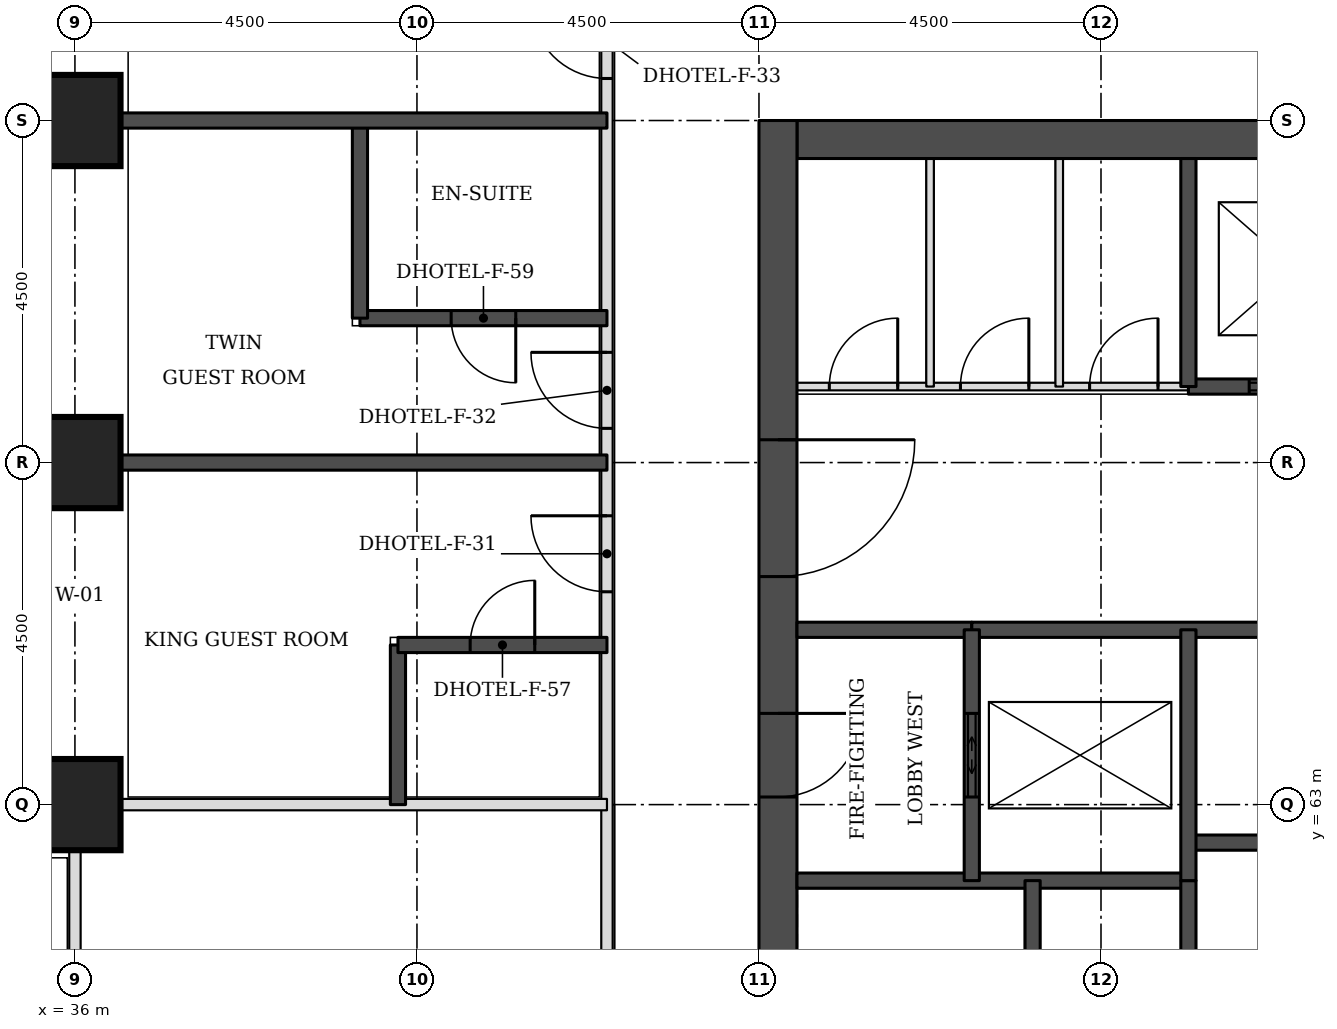
"""IFC4 building model, lengths in metres.
Left out: names, types, materials, properties, quantities, classifications, styles, units other than length and angle.
Written with IfcOpenShell. Run it as: python <this file> out.ifc"""

import sys

from ifc_helpers import new_model, si_unit, direction, frame, frame_2d, origin, origin_2d, place, context, subcontext, project, spatial, rectangle, extrude, element, fill, save


model = new_model("IFC4")
c1 = context("Model", 3, precision=1e-05, world=origin(), true_north=direction((0.0, 1.0)))
c2 = subcontext(c1, "Body", "Model", "MODEL_VIEW")
j1 = project(units=[si_unit("LENGTHUNIT", "METRE"), si_unit("PLANEANGLEUNIT", "RADIAN")], contexts=[c1])
p1 = place(None, origin())
s1 = spatial("IfcSite", under=j1, at=p1, CompositionType="ELEMENT")
p2 = place(p1, origin())
s2 = spatial("IfcBuilding", under=s1, at=p2, CompositionType="ELEMENT")
p3 = place(p2, frame((0.0, 0.0, 42.9)))
s3 = spatial("IfcBuildingStorey", under=s2, at=p3, CompositionType="ELEMENT", Elevation=42.9)
for number, where, z_axis, x_axis in (
    (1, (36.0, 63.0, 0.0), (0.0, 0.0, 1.0), (1.0, 0.0, 0.0)),
    (2, (36.0, 67.5, 0.0), (0.0, 0.0, 1.0), (1.0, 0.0, 0.0)),
    (3, (36.0, 72.0, 0.0), (0.0, 0.0, 1.0), (1.0, 0.0, 0.0)),
):
    element("IfcColumn", number, at=place(p3, frame(where, z_axis=z_axis, x_axis=x_axis)), inside=s3, PredefinedType="COLUMN", context=c2, shape_type="SweptSolid", body=[
        extrude(rectangle(XDim=1.2, YDim=1.2, at=origin_2d()), origin(), (0.0, 0.0, 1.0), 3.3),
    ])
p4 = place(p3, frame((45.5, 71.75, 0.0), z_axis=(0.0, 0.0, 1.0), x_axis=(1.0, 0.0, 0.0)))
e4 = element("IfcWall", 4, at=p4, inside=s3, PredefinedType="SHEAR", context=c2, shape_type="SweptSolid", body=[
    extrude(rectangle(XDim=21.5, YDim=0.5, at=frame_2d((10.75, 0.0))), origin(), (0.0, 0.0, 1.0), 3.3),
])
p5 = place(p3, frame((45.25, 49.5, 0.0), z_axis=(0.0, 0.0, 1.0), x_axis=(0.0, 1.0, 0.0)))
e5 = element("IfcWall", 5, at=p5, inside=s3, PredefinedType="SHEAR", context=c2, shape_type="SweptSolid", body=[
    extrude(rectangle(XDim=22.5, YDim=0.5, at=frame_2d((11.25, 0.0))), origin(), (0.0, 0.0, 1.0), 3.3),
])
p6 = place(p5, frame((4.2, 0.0, 0.0)))
e6 = element("IfcOpeningElement", 6, at=p6, cuts=e5, PredefinedType="OPENING", context=c2, shape_type="SweptSolid", body=[
    extrude(rectangle(XDim=1.8, YDim=2.1, at=frame_2d((0.9, 1.05))), frame((0.0, 0.26, 0.0), z_axis=(0.0, -1.0, 0.0), x_axis=(1.0, 0.0, 0.0)), (0.0, 0.0, 1.0), 0.52),
])
p7 = place(p5, frame((6.9, 0.0, 0.0)))
e7 = element("IfcOpeningElement", 7, at=p7, cuts=e5, PredefinedType="OPENING", context=c2, shape_type="SweptSolid", body=[
    extrude(rectangle(XDim=1.1, YDim=2.1, at=frame_2d((0.55, 1.05))), frame((0.0, 0.26, 0.0), z_axis=(0.0, -1.0, 0.0), x_axis=(1.0, 0.0, 0.0)), (0.0, 0.0, 1.0), 0.52),
])
p8 = place(p5, frame((13.6, 0.0, 0.0)))
e8 = element("IfcOpeningElement", 8, at=p8, cuts=e5, PredefinedType="OPENING", context=c2, shape_type="SweptSolid", body=[
    extrude(rectangle(XDim=1.1, YDim=2.1, at=frame_2d((0.55, 1.05))), frame((0.0, 0.26, 0.0), z_axis=(0.0, -1.0, 0.0), x_axis=(1.0, 0.0, 0.0)), (0.0, 0.0, 1.0), 0.52),
])
p9 = place(p5, frame((16.5, 0.0, 0.0)))
e9 = element("IfcOpeningElement", 9, at=p9, cuts=e5, PredefinedType="OPENING", context=c2, shape_type="SweptSolid", body=[
    extrude(rectangle(XDim=1.8, YDim=2.1, at=frame_2d((0.9, 1.05))), frame((0.0, 0.26, 0.0), z_axis=(0.0, -1.0, 0.0), x_axis=(1.0, 0.0, 0.0)), (0.0, 0.0, 1.0), 0.52),
])
p10 = place(p3, frame((43.0, 57.35, 0.0), z_axis=(0.0, 0.0, 1.0), x_axis=(0.0, 1.0, 0.0)))
e10 = element("IfcWall", 10, at=p10, inside=s3, PredefinedType="PARTITIONING", context=c2, shape_type="SweptSolid", body=[
    extrude(rectangle(XDim=16.65, YDim=0.15, at=frame_2d((8.325, 0.0))), origin(), (0.0, 0.0, 1.0), 3.08),
])
p11 = place(p10, frame((8.45, 0.0, 0.0)))
e11 = element("IfcOpeningElement", 11, at=p11, cuts=e10, PredefinedType="OPENING", context=c2, shape_type="SweptSolid", body=[
    extrude(rectangle(XDim=1.0, YDim=2.1, at=frame_2d((0.5, 1.05))), frame((0.0, 0.085, 0.0), z_axis=(0.0, -1.0, 0.0), x_axis=(1.0, 0.0, 0.0)), (0.0, 0.0, 1.0), 0.17),
])
p12 = place(p10, frame((10.6, 0.0, 0.0)))
e12 = element("IfcOpeningElement", 12, at=p12, cuts=e10, PredefinedType="OPENING", context=c2, shape_type="SweptSolid", body=[
    extrude(rectangle(XDim=1.0, YDim=2.1, at=frame_2d((0.5, 1.05))), frame((0.0, 0.085, 0.0), z_axis=(0.0, -1.0, 0.0), x_axis=(1.0, 0.0, 0.0)), (0.0, 0.0, 1.0), 0.17),
])
p13 = place(p10, frame((15.203, 0.0, 0.0)))
e13 = element("IfcOpeningElement", 13, at=p13, cuts=e10, PredefinedType="OPENING", context=c2, shape_type="SweptSolid", body=[
    extrude(rectangle(XDim=1.0, YDim=2.1, at=frame_2d((0.5, 1.05))), frame((0.0, 0.085, 0.0), z_axis=(0.0, -1.0, 0.0), x_axis=(1.0, 0.0, 0.0)), (0.0, 0.0, 1.0), 0.17),
])
p14 = place(p3, frame((40.25, 63.0, 0.0), z_axis=(0.0, 0.0, 1.0), x_axis=(0.0, 1.0, 0.0)))
e14 = element("IfcWall", 14, at=p14, inside=s3, PredefinedType="SOLIDWALL", context=c2, shape_type="SweptSolid", body=[
    extrude(rectangle(XDim=2.1, YDim=0.2, at=frame_2d((1.05, 0.0))), origin(), (0.0, 0.0, 1.0), 3.08),
])
p15 = place(p3, frame((40.25, 65.1, 0.0), z_axis=(0.0, 0.0, 1.0), x_axis=(1.0, 0.0, 0.0)))
e15 = element("IfcWall", 15, at=p15, inside=s3, PredefinedType="SOLIDWALL", context=c2, shape_type="SweptSolid", body=[
    extrude(rectangle(XDim=2.75, YDim=0.2, at=frame_2d((1.375, 0.0))), origin(), (0.0, 0.0, 1.0), 3.08),
])
p16 = place(p15, frame((0.95, 0.0, 0.0)))
e16 = element("IfcOpeningElement", 16, at=p16, cuts=e15, PredefinedType="OPENING", context=c2, shape_type="SweptSolid", body=[
    extrude(rectangle(XDim=0.85, YDim=2.1, at=frame_2d((0.425, 1.05))), frame((0.0, 0.11, 0.0), z_axis=(0.0, -1.0, 0.0), x_axis=(1.0, 0.0, 0.0)), (0.0, 0.0, 1.0), 0.22),
])
p17 = place(p3, frame((36.6, 67.5, 0.0), z_axis=(0.0, 0.0, 1.0), x_axis=(1.0, 0.0, 0.0)))
e17 = element("IfcWall", 17, at=p17, inside=s3, PredefinedType="SOLIDWALL", context=c2, shape_type="SweptSolid", body=[
    extrude(rectangle(XDim=6.4, YDim=0.2, at=frame_2d((3.2, 0.0))), origin(), (0.0, 0.0, 1.0), 3.08),
])
p18 = place(p3, frame((39.75, 69.4, 0.0), z_axis=(0.0, 0.0, 1.0), x_axis=(1.0, 0.0, 0.0)))
e18 = element("IfcWall", 18, at=p18, inside=s3, PredefinedType="SOLIDWALL", context=c2, shape_type="SweptSolid", body=[
    extrude(rectangle(XDim=3.25, YDim=0.2, at=frame_2d((1.625, 0.0))), origin(), (0.0, 0.0, 1.0), 3.08),
])
p19 = place(p18, frame((1.2, 0.0, 0.0)))
e19 = element("IfcOpeningElement", 19, at=p19, cuts=e18, PredefinedType="OPENING", context=c2, shape_type="SweptSolid", body=[
    extrude(rectangle(XDim=0.85, YDim=2.1, at=frame_2d((0.425, 1.05))), frame((0.0, 0.11, 0.0), z_axis=(0.0, -1.0, 0.0), x_axis=(1.0, 0.0, 0.0)), (0.0, 0.0, 1.0), 0.22),
])
p20 = place(p3, frame((39.75, 69.4, 0.0), z_axis=(0.0, 0.0, 1.0), x_axis=(0.0, 1.0, 0.0)))
e20 = element("IfcWall", 20, at=p20, inside=s3, PredefinedType="SOLIDWALL", context=c2, shape_type="SweptSolid", body=[
    extrude(rectangle(XDim=2.6, YDim=0.2, at=frame_2d((1.3, 0.0))), origin(), (0.0, 0.0, 1.0), 3.08),
])
p21 = place(p3, frame((36.6, 72.0, 0.0), z_axis=(0.0, 0.0, 1.0), x_axis=(1.0, 0.0, 0.0)))
e21 = element("IfcWall", 21, at=p21, inside=s3, PredefinedType="SOLIDWALL", context=c2, shape_type="SweptSolid", body=[
    extrude(rectangle(XDim=6.4, YDim=0.2, at=frame_2d((3.2, 0.0))), origin(), (0.0, 0.0, 1.0), 3.08),
])
p22 = place(p3, frame((36.0, 57.35, 0.0), z_axis=(0.0, 0.0, 1.0), x_axis=(0.0, 1.0, 0.0)))
e22 = element("IfcWall", 22, at=p22, inside=s3, PredefinedType="PARTITIONING", context=c2, shape_type="SweptSolid", body=[
    extrude(rectangle(XDim=5.05, YDim=0.15, at=frame_2d((2.525, 0.0))), origin(), (0.0, 0.0, 1.0), 2.33),
])
p23 = place(p3, frame((36.6, 63.0, 0.0), z_axis=(0.0, 0.0, 1.0), x_axis=(1.0, 0.0, 0.0)))
e23 = element("IfcWall", 23, at=p23, inside=s3, PredefinedType="PARTITIONING", context=c2, shape_type="SweptSolid", body=[
    extrude(rectangle(XDim=6.4, YDim=0.15, at=frame_2d((3.2, 0.0))), origin(), (0.0, 0.0, 1.0), 3.08),
])
p24 = place(p3, frame((45.5, 62.0, 0.0), z_axis=(0.0, 0.0, 1.0), x_axis=(1.0, 0.0, 0.0)))
e24 = element("IfcWall", 24, at=p24, inside=s3, PredefinedType="SOLIDWALL", context=c2, shape_type="SweptSolid", body=[
    extrude(rectangle(XDim=5.15, YDim=0.2, at=frame_2d((2.575, 0.0))), origin(), (0.0, 0.0, 1.0), 3.08),
])
p25 = place(p3, frame((50.65, 62.5, 0.0), z_axis=(0.0, 0.0, 1.0), x_axis=(1.0, 0.0, 0.0)))
e25 = element("IfcWall", 25, at=p25, inside=s3, PredefinedType="SOLIDWALL", context=c2, shape_type="SweptSolid", body=[
    extrude(rectangle(XDim=11.2, YDim=0.2, at=frame_2d((5.6, 0.0))), origin(), (0.0, 0.0, 1.0), 3.3),
])
p26 = place(p3, frame((45.5, 65.3, 0.0), z_axis=(0.0, 0.0, 1.0), x_axis=(1.0, 0.0, 0.0)))
e26 = element("IfcWall", 26, at=p26, inside=s3, PredefinedType="SOLIDWALL", context=c2, shape_type="SweptSolid", body=[
    extrude(rectangle(XDim=2.3, YDim=0.2, at=frame_2d((1.15, 0.0))), origin(), (0.0, 0.0, 1.0), 3.08),
])
p27 = place(p3, frame((47.8, 65.3, 0.0), z_axis=(0.0, 0.0, 1.0), x_axis=(1.0, 0.0, 0.0)))
e27 = element("IfcWall", 27, at=p27, inside=s3, PredefinedType="SOLIDWALL", context=c2, shape_type="SweptSolid", body=[
    extrude(rectangle(XDim=16.9, YDim=0.2, at=frame_2d((8.45, 0.0))), origin(), (0.0, 0.0, 1.0), 3.08),
])
p28 = place(p3, frame((45.5, 68.5, 0.0), z_axis=(0.0, 0.0, 1.0), x_axis=(1.0, 0.0, 0.0)))
e28 = element("IfcWall", 28, at=p28, inside=s3, PredefinedType="PARTITIONING", context=c2, shape_type="SweptSolid", body=[
    extrude(rectangle(XDim=5.15, YDim=0.1, at=frame_2d((2.575, 0.0))), origin(), (0.0, 0.0, 1.0), 3.08),
])
p29 = place(p28, frame((0.426, 0.0, 0.0)))
e29 = element("IfcOpeningElement", 29, at=p29, cuts=e28, PredefinedType="OPENING", context=c2, shape_type="SweptSolid", body=[
    extrude(rectangle(XDim=0.9, YDim=2.1, at=frame_2d((0.45, 1.05))), frame((0.0, 0.06, 0.0), z_axis=(0.0, -1.0, 0.0), x_axis=(1.0, 0.0, 0.0)), (0.0, 0.0, 1.0), 0.12),
])
p30 = place(p28, frame((2.151, 0.0, 0.0)))
e30 = element("IfcOpeningElement", 30, at=p30, cuts=e28, PredefinedType="OPENING", context=c2, shape_type="SweptSolid", body=[
    extrude(rectangle(XDim=0.9, YDim=2.1, at=frame_2d((0.45, 1.05))), frame((0.0, 0.06, 0.0), z_axis=(0.0, -1.0, 0.0), x_axis=(1.0, 0.0, 0.0)), (0.0, 0.0, 1.0), 0.12),
])
p31 = place(p28, frame((3.85, 0.0, 0.0)))
e31 = element("IfcOpeningElement", 31, at=p31, cuts=e28, PredefinedType="OPENING", context=c2, shape_type="SweptSolid", body=[
    extrude(rectangle(XDim=0.9, YDim=2.1, at=frame_2d((0.45, 1.05))), frame((0.0, 0.06, 0.0), z_axis=(0.0, -1.0, 0.0), x_axis=(1.0, 0.0, 0.0)), (0.0, 0.0, 1.0), 0.12),
])
p32 = place(p3, frame((50.65, 68.5, 0.0), z_axis=(0.0, 0.0, 1.0), x_axis=(1.0, 0.0, 0.0)))
e32 = element("IfcWall", 32, at=p32, inside=s3, PredefinedType="SOLIDWALL", context=c2, shape_type="SweptSolid", body=[
    extrude(rectangle(XDim=11.2, YDim=0.2, at=frame_2d((5.6, 0.0))), origin(), (0.0, 0.0, 1.0), 3.08),
])
p33 = place(p32, frame((0.8, 0.0, 0.0)))
e33 = element("IfcOpeningElement", 33, at=p33, cuts=e32, PredefinedType="OPENING", context=c2, shape_type="SweptSolid", body=[
    extrude(rectangle(XDim=1.2, YDim=2.1, at=frame_2d((0.6, 1.05))), frame((0.0, 0.11, 0.0), z_axis=(0.0, -1.0, 0.0), x_axis=(1.0, 0.0, 0.0)), (0.0, 0.0, 1.0), 0.22),
])
p34 = place(p32, frame((3.6, 0.0, 0.0)))
e34 = element("IfcOpeningElement", 34, at=p34, cuts=e32, PredefinedType="OPENING", context=c2, shape_type="SweptSolid", body=[
    extrude(rectangle(XDim=1.2, YDim=2.1, at=frame_2d((0.6, 1.05))), frame((0.0, 0.11, 0.0), z_axis=(0.0, -1.0, 0.0), x_axis=(1.0, 0.0, 0.0)), (0.0, 0.0, 1.0), 0.22),
])
p35 = place(p32, frame((6.4, 0.0, 0.0)))
e35 = element("IfcOpeningElement", 35, at=p35, cuts=e32, PredefinedType="OPENING", context=c2, shape_type="SweptSolid", body=[
    extrude(rectangle(XDim=1.2, YDim=2.1, at=frame_2d((0.6, 1.05))), frame((0.0, 0.11, 0.0), z_axis=(0.0, -1.0, 0.0), x_axis=(1.0, 0.0, 0.0)), (0.0, 0.0, 1.0), 0.22),
])
p36 = place(p32, frame((9.2, 0.0, 0.0)))
e36 = element("IfcOpeningElement", 36, at=p36, cuts=e32, PredefinedType="OPENING", context=c2, shape_type="SweptSolid", body=[
    extrude(rectangle(XDim=1.2, YDim=2.1, at=frame_2d((0.6, 1.05))), frame((0.0, 0.11, 0.0), z_axis=(0.0, -1.0, 0.0), x_axis=(1.0, 0.0, 0.0)), (0.0, 0.0, 1.0), 0.22),
])
p37 = place(p3, frame((47.251, 68.5, 0.0), z_axis=(0.0, 0.0, 1.0), x_axis=(0.0, 1.0, 0.0)))
e37 = element("IfcWall", 37, at=p37, inside=s3, PredefinedType="PARTITIONING", context=c2, shape_type="SweptSolid", body=[
    extrude(rectangle(XDim=3.0, YDim=0.1, at=frame_2d((1.5, 0.0))), origin(), (0.0, 0.0, 1.0), 3.08),
])
p38 = place(p3, frame((47.8, 62.0, 0.0), z_axis=(0.0, 0.0, 1.0), x_axis=(0.0, 1.0, 0.0)))
e38 = element("IfcWall", 38, at=p38, inside=s3, PredefinedType="SOLIDWALL", context=c2, shape_type="SweptSolid", body=[
    extrude(rectangle(XDim=3.3, YDim=0.2, at=frame_2d((1.65, 0.0))), origin(), (0.0, 0.0, 1.0), 3.08),
])
p39 = place(p38, frame((1.1, 0.0, 0.0)))
e39 = element("IfcOpeningElement", 39, at=p39, cuts=e38, PredefinedType="OPENING", context=c2, shape_type="SweptSolid", body=[
    extrude(rectangle(XDim=1.1, YDim=2.1, at=frame_2d((0.55, 1.05))), frame((0.0, 0.11, 0.0), z_axis=(0.0, -1.0, 0.0), x_axis=(1.0, 0.0, 0.0)), (0.0, 0.0, 1.0), 0.22),
])
p40 = place(p3, frame((48.6, 56.2, 0.0), z_axis=(0.0, 0.0, 1.0), x_axis=(0.0, 1.0, 0.0)))
e40 = element("IfcWall", 40, at=p40, inside=s3, PredefinedType="SOLIDWALL", context=c2, shape_type="SweptSolid", body=[
    extrude(rectangle(XDim=5.8, YDim=0.2, at=frame_2d((2.9, 0.0))), origin(), (0.0, 0.0, 1.0), 3.08),
])
p41 = place(p3, frame((48.95, 68.5, 0.0), z_axis=(0.0, 0.0, 1.0), x_axis=(0.0, 1.0, 0.0)))
e41 = element("IfcWall", 41, at=p41, inside=s3, PredefinedType="PARTITIONING", context=c2, shape_type="SweptSolid", body=[
    extrude(rectangle(XDim=3.0, YDim=0.1, at=frame_2d((1.5, 0.0))), origin(), (0.0, 0.0, 1.0), 3.08),
])
p42 = place(p3, frame((50.65, 59.0, 0.0), z_axis=(0.0, 0.0, 1.0), x_axis=(0.0, 1.0, 0.0)))
e42 = element("IfcWall", 42, at=p42, inside=s3, PredefinedType="SOLIDWALL", context=c2, shape_type="SweptSolid", body=[
    extrude(rectangle(XDim=3.0, YDim=0.2, at=frame_2d((1.5, 0.0))), origin(), (0.0, 0.0, 1.0), 3.3),
])
p43 = place(p3, frame((50.65, 62.0, 0.0), z_axis=(0.0, 0.0, 1.0), x_axis=(0.0, 1.0, 0.0)))
e43 = element("IfcWall", 43, at=p43, inside=s3, PredefinedType="SOLIDWALL", context=c2, shape_type="SweptSolid", body=[
    extrude(rectangle(XDim=3.3, YDim=0.2, at=frame_2d((1.65, 0.0))), origin(), (0.0, 0.0, 1.0), 3.08),
])
p44 = place(p3, frame((50.65, 68.5, 0.0), z_axis=(0.0, 0.0, 1.0), x_axis=(0.0, 1.0, 0.0)))
e44 = element("IfcWall", 44, at=p44, inside=s3, PredefinedType="SOLIDWALL", context=c2, shape_type="SweptSolid", body=[
    extrude(rectangle(XDim=3.0, YDim=0.2, at=frame_2d((1.5, 0.0))), origin(), (0.0, 0.0, 1.0), 3.08),
])
p45 = place(p11, origin())
e45 = element("IfcDoor", 45, at=p45, inside=s3, OperationType="SINGLE_SWING_RIGHT", PredefinedType="DOOR", context=c2, shape_type="SweptSolid", body=[
    extrude(rectangle(XDim=1.0, YDim=2.1, at=frame_2d((0.5, 1.05))), frame((0.0, 0.025, 0.0), z_axis=(0.0, -1.0, 0.0), x_axis=(1.0, 0.0, 0.0)), (0.0, 0.0, 1.0), 0.05),
])
fill(e11, e45)
p46 = place(p16, origin())
e46 = element("IfcDoor", 46, at=p46, inside=s3, OperationType="SINGLE_SWING_RIGHT", PredefinedType="DOOR", context=c2, shape_type="SweptSolid", body=[
    extrude(rectangle(XDim=0.85, YDim=2.1, at=frame_2d((0.425, 1.05))), frame((0.0, 0.025, 0.0), z_axis=(0.0, -1.0, 0.0), x_axis=(1.0, 0.0, 0.0)), (0.0, 0.0, 1.0), 0.05),
])
fill(e16, e46)
p47 = place(p12, origin())
e47 = element("IfcDoor", 47, at=p47, inside=s3, OperationType="SINGLE_SWING_RIGHT", PredefinedType="DOOR", context=c2, shape_type="SweptSolid", body=[
    extrude(rectangle(XDim=1.0, YDim=2.1, at=frame_2d((0.5, 1.05))), frame((0.0, 0.025, 0.0), z_axis=(0.0, -1.0, 0.0), x_axis=(1.0, 0.0, 0.0)), (0.0, 0.0, 1.0), 0.05),
])
fill(e12, e47)
p48 = place(p19, frame((0.85, 0.0, 0.0), z_axis=(0.0, 0.0, 1.0), x_axis=(-1.0, 0.0, 0.0)))
e48 = element("IfcDoor", 48, at=p48, inside=s3, OperationType="SINGLE_SWING_LEFT", PredefinedType="DOOR", context=c2, shape_type="SweptSolid", body=[
    extrude(rectangle(XDim=0.85, YDim=2.1, at=frame_2d((0.425, 1.05))), frame((0.0, 0.025, 0.0), z_axis=(0.0, -1.0, 0.0), x_axis=(1.0, 0.0, 0.0)), (0.0, 0.0, 1.0), 0.05),
])
fill(e19, e48)
p49 = place(p13, origin())
e49 = element("IfcDoor", 49, at=p49, inside=s3, OperationType="SINGLE_SWING_RIGHT", PredefinedType="DOOR", context=c2, shape_type="SweptSolid", body=[
    extrude(rectangle(XDim=1.0, YDim=2.1, at=frame_2d((0.5, 1.05))), frame((0.0, 0.025, 0.0), z_axis=(0.0, -1.0, 0.0), x_axis=(1.0, 0.0, 0.0)), (0.0, 0.0, 1.0), 0.05),
])
fill(e13, e49)
p50 = place(p33, origin())
e50 = element("IfcDoor", 50, at=p50, inside=s3, OperationType="DOUBLE_DOOR_SLIDING", PredefinedType="DOOR", context=c2, shape_type="SweptSolid", body=[
    extrude(rectangle(XDim=1.2, YDim=2.1, at=frame_2d((0.6, 1.05))), frame((0.0, 0.025, 0.0), z_axis=(0.0, -1.0, 0.0), x_axis=(1.0, 0.0, 0.0)), (0.0, 0.0, 1.0), 0.05),
])
fill(e33, e50)
p51 = place(p39, origin())
e51 = element("IfcDoor", 51, at=p51, inside=s3, OperationType="DOUBLE_DOOR_SLIDING", PredefinedType="DOOR", context=c2, shape_type="SweptSolid", body=[
    extrude(rectangle(XDim=1.1, YDim=2.1, at=frame_2d((0.55, 1.05))), frame((0.0, 0.025, 0.0), z_axis=(0.0, -1.0, 0.0), x_axis=(1.0, 0.0, 0.0)), (0.0, 0.0, 1.0), 0.05),
])
fill(e39, e51)
p52 = place(p8, frame((1.1, 0.0, 0.0), z_axis=(0.0, 0.0, 1.0), x_axis=(-1.0, 0.0, 0.0)))
e52 = element("IfcDoor", 52, at=p52, inside=s3, OperationType="SINGLE_SWING_LEFT", PredefinedType="DOOR", context=c2, shape_type="SweptSolid", body=[
    extrude(rectangle(XDim=1.1, YDim=2.1, at=frame_2d((0.55, 1.05))), frame((0.0, 0.025, 0.0), z_axis=(0.0, -1.0, 0.0), x_axis=(1.0, 0.0, 0.0)), (0.0, 0.0, 1.0), 0.05),
])
fill(e8, e52)
p53 = place(p9, frame((1.8, 0.0, 0.0), z_axis=(0.0, 0.0, 1.0), x_axis=(-1.0, 0.0, 0.0)))
e53 = element("IfcDoor", 53, at=p53, inside=s3, OperationType="SINGLE_SWING_LEFT", PredefinedType="DOOR", context=c2, shape_type="SweptSolid", body=[
    extrude(rectangle(XDim=1.8, YDim=2.1, at=frame_2d((0.9, 1.05))), frame((0.0, 0.025, 0.0), z_axis=(0.0, -1.0, 0.0), x_axis=(1.0, 0.0, 0.0)), (0.0, 0.0, 1.0), 0.05),
])
fill(e9, e53)
p54 = place(p29, origin())
e54 = element("IfcDoor", 54, at=p54, inside=s3, OperationType="SINGLE_SWING_RIGHT", PredefinedType="DOOR", context=c2, shape_type="SweptSolid", body=[
    extrude(rectangle(XDim=0.9, YDim=2.1, at=frame_2d((0.45, 1.05))), frame((0.0, 0.025, 0.0), z_axis=(0.0, -1.0, 0.0), x_axis=(1.0, 0.0, 0.0)), (0.0, 0.0, 1.0), 0.05),
])
fill(e29, e54)
p55 = place(p30, origin())
e55 = element("IfcDoor", 55, at=p55, inside=s3, OperationType="SINGLE_SWING_RIGHT", PredefinedType="DOOR", context=c2, shape_type="SweptSolid", body=[
    extrude(rectangle(XDim=0.9, YDim=2.1, at=frame_2d((0.45, 1.05))), frame((0.0, 0.025, 0.0), z_axis=(0.0, -1.0, 0.0), x_axis=(1.0, 0.0, 0.0)), (0.0, 0.0, 1.0), 0.05),
])
fill(e30, e55)
p56 = place(p31, origin())
e56 = element("IfcDoor", 56, at=p56, inside=s3, OperationType="SINGLE_SWING_RIGHT", PredefinedType="DOOR", context=c2, shape_type="SweptSolid", body=[
    extrude(rectangle(XDim=0.9, YDim=2.1, at=frame_2d((0.45, 1.05))), frame((0.0, 0.025, 0.0), z_axis=(0.0, -1.0, 0.0), x_axis=(1.0, 0.0, 0.0)), (0.0, 0.0, 1.0), 0.05),
])
fill(e31, e56)
save(model, sys.argv[1])
